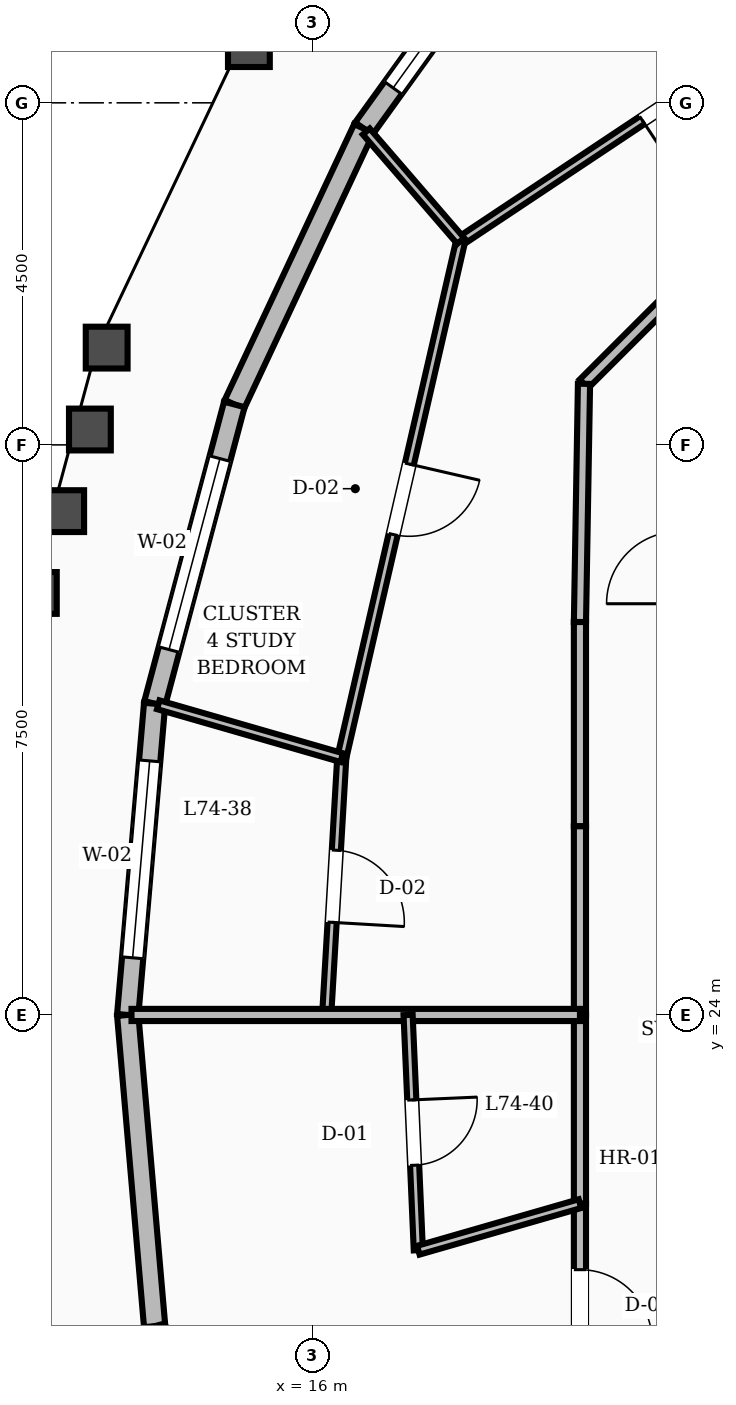
"""IFC4 building model, lengths in metres.
Left out: names, types, materials, properties, quantities, classifications, styles, units other than length and angle.
Written with IfcOpenShell. Run it as: python <this file> out.ifc"""

import sys

from ifc_helpers import new_model, si_unit, direction, frame, frame_2d, origin, place, context, subcontext, project, spatial, rectangle, extrude, element, fill, save


model = new_model("IFC4")
c1 = context("Model", 3, precision=1e-05, world=origin(), true_north=direction((0.0, 1.0)))
c2 = subcontext(c1, "Body", "Model", "MODEL_VIEW")
j1 = project(units=[si_unit("LENGTHUNIT", "METRE"), si_unit("PLANEANGLEUNIT", "RADIAN")], contexts=[c1])
p1 = place(None, origin())
s1 = spatial("IfcSite", under=j1, at=p1, CompositionType="ELEMENT")
p2 = place(p1, origin())
s2 = spatial("IfcBuilding", under=s1, at=p2, CompositionType="ELEMENT")
p3 = place(p2, frame((0.0, 0.0, 283.2)))
s3 = spatial("IfcBuildingStorey", under=s2, at=p3, CompositionType="ELEMENT", Elevation=283.2)
p4 = place(p3, frame((18.968, 38.841, 0.0), z_axis=(0.0, 0.0, 1.0), x_axis=(-0.584655758142, -0.811281482884, 0.0)))
e1 = element("IfcWall", 1, at=p4, inside=s3, PredefinedType="STANDARD", context=c2, shape_type="SweptSolid", body=[
    extrude(rectangle(XDim=3.92, YDim=0.28, at=frame_2d((1.96, 0.0))), origin(), (0.0, 0.0, 1.0), 2.88),
])
p5 = place(p4, frame((0.66, 0.0, 0.8)))
e2 = element("IfcOpeningElement", 2, at=p5, cuts=e1, PredefinedType="OPENING", context=c2, shape_type="SweptSolid", body=[
    extrude(rectangle(XDim=2.6, YDim=1.65, at=frame_2d((1.3, 0.825))), frame((0.0, 0.15, 0.0), z_axis=(0.0, -1.0, 0.0), x_axis=(1.0, 0.0, 0.0)), (0.0, 0.0, 1.0), 0.3),
])
p6 = place(p3, frame((16.676, 35.661, 0.0), z_axis=(0.0, 0.0, 1.0), x_axis=(-0.424881672648, -0.905248896297, 0.0)))
e3 = element("IfcWall", 3, at=p6, inside=s3, PredefinedType="STANDARD", context=c2, shape_type="SweptSolid", body=[
    extrude(rectangle(XDim=4.009, YDim=0.28, at=frame_2d((2.004, 0.0))), origin(), (0.0, 0.0, 1.0), 2.88),
])
p7 = place(p3, frame((14.973, 32.032, 0.0), z_axis=(0.0, 0.0, 1.0), x_axis=(-0.257409045533, -0.966302531963, 0.0)))
e4 = element("IfcWall", 4, at=p7, inside=s3, PredefinedType="STANDARD", context=c2, shape_type="SweptSolid", body=[
    extrude(rectangle(XDim=4.074, YDim=0.28, at=frame_2d((2.037, 0.0))), origin(), (0.0, 0.0, 1.0), 2.88),
])
p8 = place(p7, frame((0.737, 0.0, 0.8)))
e5 = element("IfcOpeningElement", 5, at=p8, cuts=e4, PredefinedType="OPENING", context=c2, shape_type="SweptSolid", body=[
    extrude(rectangle(XDim=2.6, YDim=1.65, at=frame_2d((1.3, 0.825))), frame((0.0, 0.15, 0.0), z_axis=(0.0, -1.0, 0.0), x_axis=(1.0, 0.0, 0.0)), (0.0, 0.0, 1.0), 0.3),
])
p9 = place(p3, frame((13.924, 28.095, 0.0), z_axis=(0.0, 0.0, 1.0), x_axis=(-0.086132326102, -0.996283705779, 0.0)))
e6 = element("IfcWall", 6, at=p9, inside=s3, PredefinedType="STANDARD", context=c2, shape_type="SweptSolid", body=[
    extrude(rectangle(XDim=4.11, YDim=0.28, at=frame_2d((2.055, 0.0))), origin(), (0.0, 0.0, 1.0), 2.88),
])
p10 = place(p9, frame((0.755, 0.0, 0.8)))
e7 = element("IfcOpeningElement", 7, at=p10, cuts=e6, PredefinedType="OPENING", context=c2, shape_type="SweptSolid", body=[
    extrude(rectangle(XDim=2.6, YDim=1.65, at=frame_2d((1.3, 0.825))), frame((0.0, 0.15, 0.0), z_axis=(0.0, -1.0, 0.0), x_axis=(1.0, 0.0, 0.0)), (0.0, 0.0, 1.0), 0.3),
])
p11 = place(p3, frame((13.57, 24.0, 0.0), z_axis=(0.0, 0.0, 1.0), x_axis=(0.086132326102, -0.996283705779, 0.0)))
e8 = element("IfcWall", 8, at=p11, inside=s3, PredefinedType="STANDARD", context=c2, shape_type="SweptSolid", body=[
    extrude(rectangle(XDim=4.11, YDim=0.28, at=frame_2d((2.055, 0.0))), origin(), (0.0, 0.0, 1.0), 2.88),
])
p12 = place(p3, frame((13.924, 19.905, 0.0), z_axis=(0.0, 0.0, 1.0), x_axis=(0.257409045533, -0.966302531963, 0.0)))
e9 = element("IfcWall", 9, at=p12, inside=s3, PredefinedType="STANDARD", context=c2, shape_type="SweptSolid", body=[
    extrude(rectangle(XDim=4.074, YDim=0.28, at=frame_2d((2.037, 0.0))), origin(), (0.0, 0.0, 1.0), 2.88),
])
p13 = place(p3, frame((21.635, 34.365, 0.0), z_axis=(0.0, 0.0, 1.0), x_axis=(-0.707106781187, -0.707106781187, 0.0)))
e10 = element("IfcWall", 10, at=p13, inside=s3, PredefinedType="SOLIDWALL", context=c2, shape_type="SweptSolid", body=[
    extrude(rectangle(XDim=2.916, YDim=0.16, at=frame_2d((1.458, 0.0))), origin(), (0.0, 0.0, 1.0), 2.87),
])
p14 = place(p3, frame((19.573, 32.303, 0.0), z_axis=(0.0, 0.0, 1.0), x_axis=(-0.016981035134, -0.999855811828, 0.0)))
e11 = element("IfcWall", 11, at=p14, inside=s3, PredefinedType="SOLIDWALL", context=c2, shape_type="SweptSolid", body=[
    extrude(rectangle(XDim=3.134, YDim=0.16, at=frame_2d((1.567, 0.0))), origin(), (0.0, 0.0, 1.0), 2.87),
])
p15 = place(p3, frame((19.52, 29.169, 0.0), z_axis=(0.0, 0.0, 1.0), x_axis=(0.0, -1.0, 0.0)))
e12 = element("IfcWall", 12, at=p15, inside=s3, PredefinedType="SOLIDWALL", context=c2, shape_type="SweptSolid", body=[
    extrude(rectangle(XDim=2.687, YDim=0.16, at=frame_2d((1.344, 0.0))), origin(), (0.0, 0.0, 1.0), 2.87),
])
for number, where, z_axis, x_axis in (
    (13, (19.52, 26.482, 0.0), (0.0, 0.0, 1.0), (0.0, -1.0, 0.0)),
    (14, (19.52, 24.0, 0.0), (0.0, 0.0, 1.0), (0.0, -1.0, 0.0)),
):
    element("IfcWall", number, at=place(p3, frame(where, z_axis=z_axis, x_axis=x_axis)), inside=s3, PredefinedType="SOLIDWALL", context=c2, shape_type="SweptSolid", body=[
        extrude(rectangle(XDim=2.482, YDim=0.16, at=frame_2d((1.241, 0.0))), origin(), (0.0, 0.0, 1.0), 2.87),
    ])
p16 = place(p3, frame((19.52, 21.518, 0.0), z_axis=(0.0, 0.0, 1.0), x_axis=(0.0, -1.0, 0.0)))
e15 = element("IfcWall", 15, at=p16, inside=s3, PredefinedType="SOLIDWALL", context=c2, shape_type="SweptSolid", body=[
    extrude(rectangle(XDim=2.687, YDim=0.16, at=frame_2d((1.344, 0.0))), origin(), (0.0, 0.0, 1.0), 2.87),
])
p17 = place(p16, frame((0.868, 0.0, 0.0)))
e16 = element("IfcOpeningElement", 16, at=p17, cuts=e15, PredefinedType="OPENING", context=c2, shape_type="SweptSolid", body=[
    extrude(rectangle(XDim=0.95, YDim=2.1, at=frame_2d((0.475, 1.05))), frame((0.0, 0.09, 0.0), z_axis=(0.0, -1.0, 0.0), x_axis=(1.0, 0.0, 0.0)), (0.0, 0.0, 1.0), 0.18),
])
p18 = place(p3, frame((23.517, 37.887, 0.0), z_axis=(0.0, 0.0, 1.0), x_axis=(-0.832572389716, -0.553916253492, 0.0)))
e17 = element("IfcWall", 17, at=p18, inside=s3, PredefinedType="PARTITIONING", context=c2, shape_type="SweptSolid", body=[
    extrude(rectangle(XDim=6.686, YDim=0.12, at=frame_2d((3.343, 0.0))), origin(), (0.0, 0.0, 1.0), 2.87),
])
p19 = place(p18, frame((2.868, 0.0, 0.0)))
e18 = element("IfcOpeningElement", 18, at=p19, cuts=e17, PredefinedType="OPENING", context=c2, shape_type="SweptSolid", body=[
    extrude(rectangle(XDim=0.95, YDim=2.1, at=frame_2d((0.475, 1.05))), frame((0.0, 0.07, 0.0), z_axis=(0.0, -1.0, 0.0), x_axis=(1.0, 0.0, 0.0)), (0.0, 0.0, 1.0), 0.14),
])
p20 = place(p3, frame((17.951, 34.183, 0.0), z_axis=(0.0, 0.0, 1.0), x_axis=(-0.224269016803, -0.97452727417, 0.0)))
e19 = element("IfcWall", 19, at=p20, inside=s3, PredefinedType="PARTITIONING", context=c2, shape_type="SweptSolid", body=[
    extrude(rectangle(XDim=6.976, YDim=0.12, at=frame_2d((3.488, 0.0))), origin(), (0.0, 0.0, 1.0), 2.87),
])
p21 = place(p20, frame((3.013, 0.0, 0.0)))
e20 = element("IfcOpeningElement", 20, at=p21, cuts=e19, PredefinedType="OPENING", context=c2, shape_type="SweptSolid", body=[
    extrude(rectangle(XDim=0.95, YDim=2.1, at=frame_2d((0.475, 1.05))), frame((0.0, 0.07, 0.0), z_axis=(0.0, -1.0, 0.0), x_axis=(1.0, 0.0, 0.0)), (0.0, 0.0, 1.0), 0.14),
])
p22 = place(p3, frame((17.951, 34.183, 0.0), z_axis=(0.0, 0.0, 1.0), x_axis=(-0.653252022003, 0.757140538968, 0.0)))
e21 = element("IfcWall", 21, at=p22, inside=s3, PredefinedType="PARTITIONING", context=c2, shape_type="SweptSolid", body=[
    extrude(rectangle(XDim=1.901, YDim=0.12, at=frame_2d((0.951, 0.0))), origin(), (0.0, 0.0, 1.0), 2.87),
])
p23 = place(p3, frame((16.386, 27.385, 0.0), z_axis=(0.0, 0.0, 1.0), x_axis=(-0.058460353497, -0.998289731025, 0.0)))
e22 = element("IfcWall", 22, at=p23, inside=s3, PredefinedType="PARTITIONING", context=c2, shape_type="SweptSolid", body=[
    extrude(rectangle(XDim=3.391, YDim=0.12, at=frame_2d((1.696, 0.0))), origin(), (0.0, 0.0, 1.0), 2.87),
])
p24 = place(p23, frame((1.22, 0.0, 0.0)))
e23 = element("IfcOpeningElement", 23, at=p24, cuts=e22, PredefinedType="OPENING", context=c2, shape_type="SweptSolid", body=[
    extrude(rectangle(XDim=0.95, YDim=2.1, at=frame_2d((0.475, 1.05))), frame((0.0, 0.07, 0.0), z_axis=(0.0, -1.0, 0.0), x_axis=(1.0, 0.0, 0.0)), (0.0, 0.0, 1.0), 0.14),
])
p25 = place(p3, frame((16.386, 27.385, 0.0), z_axis=(0.0, 0.0, 1.0), x_axis=(-0.960909145443, 0.276863891117, 0.0)))
e24 = element("IfcWall", 24, at=p25, inside=s3, PredefinedType="PARTITIONING", context=c2, shape_type="SweptSolid", body=[
    extrude(rectangle(XDim=2.512, YDim=0.12, at=frame_2d((1.256, 0.0))), origin(), (0.0, 0.0, 1.0), 2.87),
])
p26 = place(p3, frame((19.52, 24.0, 0.0), z_axis=(0.0, 0.0, 1.0), x_axis=(-1.0, 0.0, 0.0)))
e25 = element("IfcWall", 25, at=p26, inside=s3, PredefinedType="SOLIDWALL", context=c2, shape_type="SweptSolid", body=[
    extrude(rectangle(XDim=5.9, YDim=0.16, at=frame_2d((2.95, 0.0))), origin(), (0.0, 0.0, 1.0), 2.87),
])
p27 = place(p3, frame((17.259, 24.0, 0.0), z_axis=(0.0, 0.0, 1.0), x_axis=(0.04349877907, -0.99905348016, 0.0)))
e26 = element("IfcWall", 26, at=p27, inside=s3, PredefinedType="PARTITIONING", context=c2, shape_type="SweptSolid", body=[
    extrude(rectangle(XDim=3.098, YDim=0.12, at=frame_2d((1.549, 0.0))), origin(), (0.0, 0.0, 1.0), 2.87),
])
p28 = place(p27, frame((1.119, 0.0, 0.0)))
e27 = element("IfcOpeningElement", 27, at=p28, cuts=e26, PredefinedType="OPENING", context=c2, shape_type="SweptSolid", body=[
    extrude(rectangle(XDim=0.86, YDim=2.1, at=frame_2d((0.43, 1.05))), frame((0.0, 0.07, 0.0), z_axis=(0.0, -1.0, 0.0), x_axis=(1.0, 0.0, 0.0)), (0.0, 0.0, 1.0), 0.14),
])
p29 = place(p3, frame((19.52, 21.518, 0.0), z_axis=(0.0, 0.0, 1.0), x_axis=(-0.960888543989, -0.27693538241, 0.0)))
e28 = element("IfcWall", 28, at=p29, inside=s3, PredefinedType="PARTITIONING", context=c2, shape_type="SweptSolid", body=[
    extrude(rectangle(XDim=2.213, YDim=0.12, at=frame_2d((1.106, 0.0))), origin(), (0.0, 0.0, 1.0), 2.87),
])
p30 = place(p5, origin())
e29 = element("IfcWindow", 29, at=p30, inside=s3, PartitioningType="SINGLE_PANEL", PredefinedType="WINDOW", context=c2, shape_type="SweptSolid", body=[
    extrude(rectangle(XDim=2.6, YDim=1.65, at=frame_2d((1.3, 0.825))), frame((0.0, 0.03, 0.0), z_axis=(0.0, -1.0, 0.0), x_axis=(1.0, 0.0, 0.0)), (0.0, 0.0, 1.0), 0.06),
])
fill(e2, e29)
p31 = place(p8, origin())
e30 = element("IfcWindow", 30, at=p31, inside=s3, PartitioningType="SINGLE_PANEL", PredefinedType="WINDOW", context=c2, shape_type="SweptSolid", body=[
    extrude(rectangle(XDim=2.6, YDim=1.65, at=frame_2d((1.3, 0.825))), frame((0.0, 0.03, 0.0), z_axis=(0.0, -1.0, 0.0), x_axis=(1.0, 0.0, 0.0)), (0.0, 0.0, 1.0), 0.06),
])
fill(e5, e30)
p32 = place(p10, origin())
e31 = element("IfcWindow", 31, at=p32, inside=s3, PartitioningType="SINGLE_PANEL", PredefinedType="WINDOW", context=c2, shape_type="SweptSolid", body=[
    extrude(rectangle(XDim=2.6, YDim=1.65, at=frame_2d((1.3, 0.825))), frame((0.0, 0.03, 0.0), z_axis=(0.0, -1.0, 0.0), x_axis=(1.0, 0.0, 0.0)), (0.0, 0.0, 1.0), 0.06),
])
fill(e7, e31)
p33 = place(p19, origin())
e32 = element("IfcDoor", 32, at=p33, inside=s3, OperationType="SINGLE_SWING_RIGHT", PredefinedType="DOOR", context=c2, shape_type="SweptSolid", body=[
    extrude(rectangle(XDim=0.95, YDim=2.1, at=frame_2d((0.475, 1.05))), frame((0.0, 0.025, 0.0), z_axis=(0.0, -1.0, 0.0), x_axis=(1.0, 0.0, 0.0)), (0.0, 0.0, 1.0), 0.05),
])
fill(e18, e32)
p34 = place(p21, origin())
e33 = element("IfcDoor", 33, at=p34, inside=s3, OperationType="SINGLE_SWING_LEFT", PredefinedType="DOOR", context=c2, shape_type="SweptSolid", body=[
    extrude(rectangle(XDim=0.95, YDim=2.1, at=frame_2d((0.475, 1.05))), frame((0.0, 0.025, 0.0), z_axis=(0.0, -1.0, 0.0), x_axis=(1.0, 0.0, 0.0)), (0.0, 0.0, 1.0), 0.05),
])
fill(e20, e33)
p35 = place(p24, origin())
e34 = element("IfcDoor", 34, at=p35, inside=s3, OperationType="SINGLE_SWING_RIGHT", PredefinedType="DOOR", context=c2, shape_type="SweptSolid", body=[
    extrude(rectangle(XDim=0.95, YDim=2.1, at=frame_2d((0.475, 1.05))), frame((0.0, 0.025, 0.0), z_axis=(0.0, -1.0, 0.0), x_axis=(1.0, 0.0, 0.0)), (0.0, 0.0, 1.0), 0.05),
])
fill(e23, e34)
p36 = place(p28, origin())
e35 = element("IfcDoor", 35, at=p36, inside=s3, OperationType="SINGLE_SWING_LEFT", PredefinedType="DOOR", context=c2, shape_type="SweptSolid", body=[
    extrude(rectangle(XDim=0.86, YDim=2.1, at=frame_2d((0.43, 1.05))), frame((0.0, 0.025, 0.0), z_axis=(0.0, -1.0, 0.0), x_axis=(1.0, 0.0, 0.0)), (0.0, 0.0, 1.0), 0.05),
])
fill(e27, e35)
p37 = place(p17, origin())
e36 = element("IfcDoor", 36, at=p37, inside=s3, OperationType="SINGLE_SWING_RIGHT", PredefinedType="DOOR", context=c2, shape_type="SweptSolid", body=[
    extrude(rectangle(XDim=0.95, YDim=2.1, at=frame_2d((0.475, 1.05))), frame((0.0, 0.025, 0.0), z_axis=(0.0, -1.0, 0.0), x_axis=(1.0, 0.0, 0.0)), (0.0, 0.0, 1.0), 0.05),
])
fill(e16, e36)
save(model, sys.argv[1])
